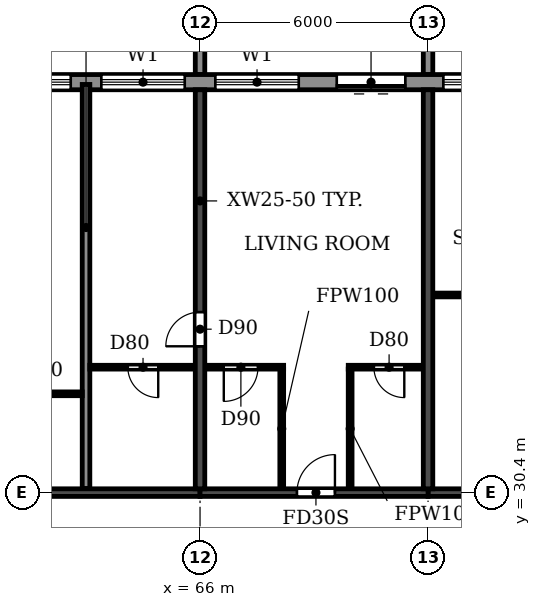
"""IFC4 building model, lengths in metres.
Left out: names, types, materials, properties, quantities, classifications, styles, units other than length and angle.
Written with IfcOpenShell. Run it as: python <this file> out.ifc"""

import sys

from ifc_helpers import new_model, si_unit, direction, frame, frame_2d, origin, place, context, subcontext, project, spatial, polyline, rectangle, outline, extrude, source, transform, mapped, element, fill, save


model = new_model("IFC4")
c1 = context("Model", 3, precision=1e-05, world=origin(), true_north=direction((0.0, 1.0)))
c2 = subcontext(c1, "Body", "Model", "MODEL_VIEW")
j1 = project(units=[si_unit("LENGTHUNIT", "METRE"), si_unit("PLANEANGLEUNIT", "RADIAN")], contexts=[c1])
p1 = place(None, origin())
s1 = spatial("IfcSite", under=j1, at=p1, CompositionType="ELEMENT")
p2 = place(p1, origin())
s2 = spatial("IfcBuilding", under=s1, at=p2, CompositionType="ELEMENT")
p3 = place(p2, frame((0.0, 0.0, 191.7)))
s3 = spatial("IfcBuildingStorey", under=s2, at=p3, CompositionType="ELEMENT", Elevation=191.7)
p4 = place(p3, frame((66.0, 30.5, 0.0), z_axis=(0.0, 0.0, 1.0), x_axis=(0.0, 1.0, 0.0)))
e1 = element("IfcWall", 1, at=p4, inside=s3, PredefinedType="SHEAR", context=c2, shape_type="SweptSolid", body=[
    extrude(rectangle(XDim=10.5, YDim=0.25, at=frame_2d((5.25, 0.0))), origin(), (0.0, 0.0, 1.0), 3.08),
])
p5 = place(p4, frame((3.75, 0.0, 0.0)))
e2 = element("IfcOpeningElement", 2, at=p5, cuts=e1, PredefinedType="OPENING", context=c2, shape_type="SweptSolid", body=[
    extrude(rectangle(XDim=0.9, YDim=2.1, at=frame_2d((0.45, 1.05))), frame((0.0, 0.135, 0.0), z_axis=(0.0, -1.0, 0.0), x_axis=(1.0, 0.0, 0.0)), (0.0, 0.0, 1.0), 0.27),
])
p6 = place(p3, frame((72.0, 30.5, 0.0), z_axis=(0.0, 0.0, 1.0), x_axis=(0.0, 1.0, 0.0)))
e3 = element("IfcWall", 3, at=p6, inside=s3, PredefinedType="SHEAR", context=c2, shape_type="SweptSolid", body=[
    extrude(rectangle(XDim=10.5, YDim=0.25, at=frame_2d((5.25, 0.0))), origin(), (0.0, 0.0, 1.0), 3.08),
])
p7 = place(p3, frame((60.0, 30.4, 0.0), z_axis=(0.0, 0.0, 1.0), x_axis=(1.0, 0.0, 0.0)))
e4 = element("IfcWall", 4, at=p7, inside=s3, PredefinedType="SHEAR", context=c2, shape_type="SweptSolid", body=[
    extrude(rectangle(XDim=6.0, YDim=0.2, at=frame_2d((3.0, 0.0))), origin(), (0.0, 0.0, 1.0), 2.48),
])
p8 = place(p3, frame((66.0, 30.4, 0.0), z_axis=(0.0, 0.0, 1.0), x_axis=(1.0, 0.0, 0.0)))
e5 = element("IfcWall", 5, at=p8, inside=s3, PredefinedType="SHEAR", context=c2, shape_type="SweptSolid", body=[
    extrude(rectangle(XDim=6.0, YDim=0.2, at=frame_2d((3.0, 0.0))), origin(), (0.0, 0.0, 1.0), 2.48),
])
p9 = place(p8, frame((2.55, 0.0, 0.0)))
e6 = element("IfcOpeningElement", 6, at=p9, cuts=e5, PredefinedType="OPENING", context=c2, shape_type="SweptSolid", body=[
    extrude(rectangle(XDim=1.0, YDim=2.1, at=frame_2d((0.5, 1.05))), frame((0.0, 0.11, 0.0), z_axis=(0.0, -1.0, 0.0), x_axis=(1.0, 0.0, 0.0)), (0.0, 0.0, 1.0), 0.22),
])
p10 = place(p3, frame((72.0, 30.4, 0.0), z_axis=(0.0, 0.0, 1.0), x_axis=(1.0, 0.0, 0.0)))
e7 = element("IfcWall", 7, at=p10, inside=s3, PredefinedType="SHEAR", context=c2, shape_type="SweptSolid", body=[
    extrude(rectangle(XDim=6.0, YDim=0.2, at=frame_2d((3.0, 0.0))), origin(), (0.0, 0.0, 1.0), 2.48),
])
p11 = place(p10, frame((2.55, 0.0, 0.0)))
e8 = element("IfcOpeningElement", 8, at=p11, cuts=e7, PredefinedType="OPENING", context=c2, shape_type="SweptSolid", body=[
    extrude(rectangle(XDim=1.0, YDim=2.1, at=frame_2d((0.5, 1.05))), frame((0.0, 0.11, 0.0), z_axis=(0.0, -1.0, 0.0), x_axis=(1.0, 0.0, 0.0)), (0.0, 0.0, 1.0), 0.22),
])
p12 = place(p3, frame((79.317, 41.2, 0.0), z_axis=(0.0, 0.0, 1.0), x_axis=(-1.0, 0.0, 0.0)))
e9 = element("IfcWall", 9, at=p12, inside=s3, PredefinedType="STANDARD", context=c2, shape_type="SweptSolid", body=[
    extrude(rectangle(XDim=56.634, YDim=0.4, at=frame_2d((28.317, 0.0))), origin(), (0.0, 0.0, 1.0), 3.08),
])
p13 = place(p12, frame((52.917, 0.0, 0.0)))
e10 = element("IfcOpeningElement", 10, at=p13, cuts=e9, PredefinedType="OPENING", context=c2, shape_type="SweptSolid", body=[
    extrude(rectangle(XDim=1.8, YDim=2.4, at=frame_2d((0.9, 1.2))), frame((0.0, 0.21, 0.0), z_axis=(0.0, -1.0, 0.0), x_axis=(1.0, 0.0, 0.0)), (0.0, 0.0, 1.0), 0.42),
])
p14 = place(p12, frame((49.717, 0.0, 0.9)))
e11 = element("IfcOpeningElement", 11, at=p14, cuts=e9, PredefinedType="OPENING", context=c2, shape_type="SweptSolid", body=[
    extrude(rectangle(XDim=2.2, YDim=1.5, at=frame_2d((1.1, 0.75))), frame((0.0, 0.21, 0.0), z_axis=(0.0, -1.0, 0.0), x_axis=(1.0, 0.0, 0.0)), (0.0, 0.0, 1.0), 0.42),
])
p15 = place(p12, frame((46.917, 0.0, 0.0)))
e12 = element("IfcOpeningElement", 12, at=p15, cuts=e9, PredefinedType="OPENING", context=c2, shape_type="SweptSolid", body=[
    extrude(rectangle(XDim=1.8, YDim=2.4, at=frame_2d((0.9, 1.2))), frame((0.0, 0.21, 0.0), z_axis=(0.0, -1.0, 0.0), x_axis=(1.0, 0.0, 0.0)), (0.0, 0.0, 1.0), 0.42),
])
p16 = place(p12, frame((43.717, 0.0, 0.9)))
e13 = element("IfcOpeningElement", 13, at=p16, cuts=e9, PredefinedType="OPENING", context=c2, shape_type="SweptSolid", body=[
    extrude(rectangle(XDim=2.2, YDim=1.5, at=frame_2d((1.1, 0.75))), frame((0.0, 0.21, 0.0), z_axis=(0.0, -1.0, 0.0), x_axis=(1.0, 0.0, 0.0)), (0.0, 0.0, 1.0), 0.42),
])
p17 = place(p12, frame((40.717, 0.0, 0.9)))
e14 = element("IfcOpeningElement", 14, at=p17, cuts=e9, PredefinedType="OPENING", context=c2, shape_type="SweptSolid", body=[
    extrude(rectangle(XDim=2.2, YDim=1.5, at=frame_2d((1.1, 0.75))), frame((0.0, 0.21, 0.0), z_axis=(0.0, -1.0, 0.0), x_axis=(1.0, 0.0, 0.0)), (0.0, 0.0, 1.0), 0.42),
])
p18 = place(p12, frame((37.717, 0.0, 0.9)))
e15 = element("IfcOpeningElement", 15, at=p18, cuts=e9, PredefinedType="OPENING", context=c2, shape_type="SweptSolid", body=[
    extrude(rectangle(XDim=2.2, YDim=1.5, at=frame_2d((1.1, 0.75))), frame((0.0, 0.21, 0.0), z_axis=(0.0, -1.0, 0.0), x_axis=(1.0, 0.0, 0.0)), (0.0, 0.0, 1.0), 0.42),
])
p19 = place(p12, frame((34.917, 0.0, 0.0)))
e16 = element("IfcOpeningElement", 16, at=p19, cuts=e9, PredefinedType="OPENING", context=c2, shape_type="SweptSolid", body=[
    extrude(rectangle(XDim=1.8, YDim=2.4, at=frame_2d((0.9, 1.2))), frame((0.0, 0.21, 0.0), z_axis=(0.0, -1.0, 0.0), x_axis=(1.0, 0.0, 0.0)), (0.0, 0.0, 1.0), 0.42),
])
p20 = place(p12, frame((31.717, 0.0, 0.9)))
e17 = element("IfcOpeningElement", 17, at=p20, cuts=e9, PredefinedType="OPENING", context=c2, shape_type="SweptSolid", body=[
    extrude(rectangle(XDim=2.2, YDim=1.5, at=frame_2d((1.1, 0.75))), frame((0.0, 0.21, 0.0), z_axis=(0.0, -1.0, 0.0), x_axis=(1.0, 0.0, 0.0)), (0.0, 0.0, 1.0), 0.42),
])
p21 = place(p12, frame((28.717, 0.0, 0.9)))
e18 = element("IfcOpeningElement", 18, at=p21, cuts=e9, PredefinedType="OPENING", context=c2, shape_type="SweptSolid", body=[
    extrude(rectangle(XDim=2.2, YDim=1.5, at=frame_2d((1.1, 0.75))), frame((0.0, 0.21, 0.0), z_axis=(0.0, -1.0, 0.0), x_axis=(1.0, 0.0, 0.0)), (0.0, 0.0, 1.0), 0.42),
])
p22 = place(p12, frame((25.717, 0.0, 0.9)))
e19 = element("IfcOpeningElement", 19, at=p22, cuts=e9, PredefinedType="OPENING", context=c2, shape_type="SweptSolid", body=[
    extrude(rectangle(XDim=2.2, YDim=1.5, at=frame_2d((1.1, 0.75))), frame((0.0, 0.21, 0.0), z_axis=(0.0, -1.0, 0.0), x_axis=(1.0, 0.0, 0.0)), (0.0, 0.0, 1.0), 0.42),
])
p23 = place(p12, frame((22.917, 0.0, 0.0)))
e20 = element("IfcOpeningElement", 20, at=p23, cuts=e9, PredefinedType="OPENING", context=c2, shape_type="SweptSolid", body=[
    extrude(rectangle(XDim=1.8, YDim=2.4, at=frame_2d((0.9, 1.2))), frame((0.0, 0.21, 0.0), z_axis=(0.0, -1.0, 0.0), x_axis=(1.0, 0.0, 0.0)), (0.0, 0.0, 1.0), 0.42),
])
p24 = place(p12, frame((19.717, 0.0, 0.9)))
e21 = element("IfcOpeningElement", 21, at=p24, cuts=e9, PredefinedType="OPENING", context=c2, shape_type="SweptSolid", body=[
    extrude(rectangle(XDim=2.2, YDim=1.5, at=frame_2d((1.1, 0.75))), frame((0.0, 0.21, 0.0), z_axis=(0.0, -1.0, 0.0), x_axis=(1.0, 0.0, 0.0)), (0.0, 0.0, 1.0), 0.42),
])
p25 = place(p12, frame((16.717, 0.0, 0.9)))
e22 = element("IfcOpeningElement", 22, at=p25, cuts=e9, PredefinedType="OPENING", context=c2, shape_type="SweptSolid", body=[
    extrude(rectangle(XDim=2.2, YDim=1.5, at=frame_2d((1.1, 0.75))), frame((0.0, 0.21, 0.0), z_axis=(0.0, -1.0, 0.0), x_axis=(1.0, 0.0, 0.0)), (0.0, 0.0, 1.0), 0.42),
])
p26 = place(p12, frame((13.717, 0.0, 0.9)))
e23 = element("IfcOpeningElement", 23, at=p26, cuts=e9, PredefinedType="OPENING", context=c2, shape_type="SweptSolid", body=[
    extrude(rectangle(XDim=2.2, YDim=1.5, at=frame_2d((1.1, 0.75))), frame((0.0, 0.21, 0.0), z_axis=(0.0, -1.0, 0.0), x_axis=(1.0, 0.0, 0.0)), (0.0, 0.0, 1.0), 0.42),
])
p27 = place(p12, frame((10.717, 0.0, 0.9)))
e24 = element("IfcOpeningElement", 24, at=p27, cuts=e9, PredefinedType="OPENING", context=c2, shape_type="SweptSolid", body=[
    extrude(rectangle(XDim=2.2, YDim=1.5, at=frame_2d((1.1, 0.75))), frame((0.0, 0.21, 0.0), z_axis=(0.0, -1.0, 0.0), x_axis=(1.0, 0.0, 0.0)), (0.0, 0.0, 1.0), 0.42),
])
p28 = place(p12, frame((7.917, 0.0, 0.0)))
e25 = element("IfcOpeningElement", 25, at=p28, cuts=e9, PredefinedType="OPENING", context=c2, shape_type="SweptSolid", body=[
    extrude(rectangle(XDim=1.8, YDim=2.4, at=frame_2d((0.9, 1.2))), frame((0.0, 0.21, 0.0), z_axis=(0.0, -1.0, 0.0), x_axis=(1.0, 0.0, 0.0)), (0.0, 0.0, 1.0), 0.42),
])
p29 = place(p12, frame((4.717, 0.0, 0.9)))
e26 = element("IfcOpeningElement", 26, at=p29, cuts=e9, PredefinedType="OPENING", context=c2, shape_type="SweptSolid", body=[
    extrude(rectangle(XDim=2.2, YDim=1.5, at=frame_2d((1.1, 0.75))), frame((0.0, 0.21, 0.0), z_axis=(0.0, -1.0, 0.0), x_axis=(1.0, 0.0, 0.0)), (0.0, 0.0, 1.0), 0.42),
])
p30 = place(p12, frame((1.917, 0.0, 0.0)))
e27 = element("IfcOpeningElement", 27, at=p30, cuts=e9, PredefinedType="OPENING", context=c2, shape_type="SweptSolid", body=[
    extrude(rectangle(XDim=1.8, YDim=2.4, at=frame_2d((0.9, 1.2))), frame((0.0, 0.21, 0.0), z_axis=(0.0, -1.0, 0.0), x_axis=(1.0, 0.0, 0.0)), (0.0, 0.0, 1.0), 0.42),
])
m1 = source(origin(), c2, "Body", "SweptSolid", [
    extrude(outline(polyline([(0.0, 0.0), (0.25, 0.0), (0.25, 3.1), (0.0, 3.1), (0.0, 0.0)])), origin(), (0.0, 0.0, 1.0), 3.1),
])
for number, where in (
    (28, (65.875, 41.4, 0.0)),
    (29, (71.875, 41.4, 0.0)),
):
    element("IfcWall", number, at=place(p3, frame(where)), inside=s3, PredefinedType="STANDARD", context=c2, shape_type="MappedRepresentation", body=[
        mapped(m1, transform((0.0, 0.0, 0.0))),
    ])
p31 = place(p3, frame((63.0, 30.51, 0.0), z_axis=(0.0, 0.0, 1.0), x_axis=(0.0, 1.0, 0.0)))
e30 = element("IfcWall", 30, at=p31, inside=s3, PredefinedType="PARTITIONING", context=c2, shape_type="SweptSolid", body=[
    extrude(rectangle(XDim=10.63, YDim=0.2, at=frame_2d((5.315, 0.0))), origin(), (0.0, 0.0, 1.0), 3.08),
])
p32 = place(p3, frame((60.135, 33.0, 0.0), z_axis=(0.0, 0.0, 1.0), x_axis=(1.0, 0.0, 0.0)))
e31 = element("IfcWall", 31, at=p32, inside=s3, PredefinedType="PARTITIONING", context=c2, shape_type="SweptSolid", body=[
    extrude(rectangle(XDim=2.765, YDim=0.1, at=frame_2d((1.382, 0.0))), origin(), (0.0, 0.0, 1.0), 3.08),
])
p33 = place(p32, frame((0.965, 0.0, 0.0)))
e32 = element("IfcOpeningElement", 32, at=p33, cuts=e31, PredefinedType="OPENING", context=c2, shape_type="SweptSolid", body=[
    extrude(rectangle(XDim=0.8, YDim=2.1, at=frame_2d((0.4, 1.05))), frame((0.0, 0.06, 0.0), z_axis=(0.0, -1.0, 0.0), x_axis=(1.0, 0.0, 0.0)), (0.0, 0.0, 1.0), 0.12),
])
p34 = place(p3, frame((63.1, 33.7, 0.0), z_axis=(0.0, 0.0, 1.0), x_axis=(1.0, 0.0, 0.0)))
e33 = element("IfcWall", 33, at=p34, inside=s3, PredefinedType="PARTITIONING", context=c2, shape_type="SweptSolid", body=[
    extrude(rectangle(XDim=2.765, YDim=0.1, at=frame_2d((1.382, 0.0))), origin(), (0.0, 0.0, 1.0), 3.08),
])
p35 = place(p34, frame((1.0, 0.0, 0.0)))
e34 = element("IfcOpeningElement", 34, at=p35, cuts=e33, PredefinedType="OPENING", context=c2, shape_type="SweptSolid", body=[
    extrude(rectangle(XDim=0.8, YDim=2.1, at=frame_2d((0.4, 1.05))), frame((0.0, 0.06, 0.0), z_axis=(0.0, -1.0, 0.0), x_axis=(1.0, 0.0, 0.0)), (0.0, 0.0, 1.0), 0.12),
])
p36 = place(p3, frame((66.135, 33.7, 0.0), z_axis=(0.0, 0.0, 1.0), x_axis=(1.0, 0.0, 0.0)))
e35 = element("IfcWall", 35, at=p36, inside=s3, PredefinedType="PARTITIONING", context=c2, shape_type="SweptSolid", body=[
    extrude(rectangle(XDim=2.065, YDim=0.1, at=frame_2d((1.032, 0.0))), origin(), (0.0, 0.0, 1.0), 3.08),
])
p37 = place(p36, frame((0.49, 0.0, 0.0)))
e36 = element("IfcOpeningElement", 36, at=p37, cuts=e35, PredefinedType="OPENING", context=c2, shape_type="SweptSolid", body=[
    extrude(rectangle(XDim=0.9, YDim=2.1, at=frame_2d((0.45, 1.05))), frame((0.0, 0.06, 0.0), z_axis=(0.0, -1.0, 0.0), x_axis=(1.0, 0.0, 0.0)), (0.0, 0.0, 1.0), 0.12),
])
p38 = place(p3, frame((69.9, 33.7, 0.0), z_axis=(0.0, 0.0, 1.0), x_axis=(1.0, 0.0, 0.0)))
e37 = element("IfcWall", 37, at=p38, inside=s3, PredefinedType="PARTITIONING", context=c2, shape_type="SweptSolid", body=[
    extrude(rectangle(XDim=1.965, YDim=0.1, at=frame_2d((0.982, 0.0))), origin(), (0.0, 0.0, 1.0), 3.08),
])
p39 = place(p38, frame((0.675, 0.0, 0.0)))
e38 = element("IfcOpeningElement", 38, at=p39, cuts=e37, PredefinedType="OPENING", context=c2, shape_type="SweptSolid", body=[
    extrude(rectangle(XDim=0.8, YDim=2.1, at=frame_2d((0.4, 1.05))), frame((0.0, 0.06, 0.0), z_axis=(0.0, -1.0, 0.0), x_axis=(1.0, 0.0, 0.0)), (0.0, 0.0, 1.0), 0.12),
])
p40 = place(p3, frame((72.135, 35.6, 0.0), z_axis=(0.0, 0.0, 1.0), x_axis=(1.0, 0.0, 0.0)))
e39 = element("IfcWall", 39, at=p40, inside=s3, PredefinedType="PARTITIONING", context=c2, shape_type="SweptSolid", body=[
    extrude(rectangle(XDim=2.065, YDim=0.1, at=frame_2d((1.032, 0.0))), origin(), (0.0, 0.0, 1.0), 3.08),
])
for number, where, z_axis, x_axis in (
    (40, (68.15, 30.51, 0.0), (0.0, 0.0, 1.0), (0.0, 1.0, 0.0)),
    (41, (69.95, 30.51, 0.0), (0.0, 0.0, 1.0), (0.0, 1.0, 0.0)),
):
    element("IfcWall", number, at=place(p3, frame(where, z_axis=z_axis, x_axis=x_axis)), inside=s3, PredefinedType="PARTITIONING", context=c2, shape_type="SweptSolid", body=[
        extrude(rectangle(XDim=3.14, YDim=0.1, at=frame_2d((1.57, 0.0))), origin(), (0.0, 0.0, 1.0), 3.08),
    ])
p41 = place(p25, origin())
e42 = element("IfcWindow", 42, at=p41, inside=s3, PartitioningType="DOUBLE_PANEL_HORIZONTAL", PredefinedType="WINDOW", context=c2, shape_type="SweptSolid", body=[
    extrude(rectangle(XDim=2.2, YDim=1.5, at=frame_2d((1.1, 0.75))), frame((0.0, 0.03, 0.0), z_axis=(0.0, -1.0, 0.0), x_axis=(1.0, 0.0, 0.0)), (0.0, 0.0, 1.0), 0.06),
])
fill(e22, e42)
p42 = place(p26, origin())
e43 = element("IfcWindow", 43, at=p42, inside=s3, PartitioningType="DOUBLE_PANEL_HORIZONTAL", PredefinedType="WINDOW", context=c2, shape_type="SweptSolid", body=[
    extrude(rectangle(XDim=2.2, YDim=1.5, at=frame_2d((1.1, 0.75))), frame((0.0, 0.03, 0.0), z_axis=(0.0, -1.0, 0.0), x_axis=(1.0, 0.0, 0.0)), (0.0, 0.0, 1.0), 0.06),
])
fill(e23, e43)
p43 = place(p27, origin())
e44 = element("IfcWindow", 44, at=p43, inside=s3, PartitioningType="DOUBLE_PANEL_HORIZONTAL", PredefinedType="WINDOW", context=c2, shape_type="SweptSolid", body=[
    extrude(rectangle(XDim=2.2, YDim=1.5, at=frame_2d((1.1, 0.75))), frame((0.0, 0.03, 0.0), z_axis=(0.0, -1.0, 0.0), x_axis=(1.0, 0.0, 0.0)), (0.0, 0.0, 1.0), 0.06),
])
fill(e24, e44)
p44 = place(p28, origin())
e45 = element("IfcDoor", 45, at=p44, inside=s3, OperationType="DOUBLE_DOOR_SLIDING", PredefinedType="DOOR", context=c2, shape_type="SweptSolid", body=[
    extrude(rectangle(XDim=1.8, YDim=2.4, at=frame_2d((0.9, 1.2))), frame((0.0, 0.025, 0.0), z_axis=(0.0, -1.0, 0.0), x_axis=(1.0, 0.0, 0.0)), (0.0, 0.0, 1.0), 0.05),
])
fill(e25, e45)
p45 = place(p29, origin())
e46 = element("IfcWindow", 46, at=p45, inside=s3, PartitioningType="DOUBLE_PANEL_HORIZONTAL", PredefinedType="WINDOW", context=c2, shape_type="SweptSolid", body=[
    extrude(rectangle(XDim=2.2, YDim=1.5, at=frame_2d((1.1, 0.75))), frame((0.0, 0.03, 0.0), z_axis=(0.0, -1.0, 0.0), x_axis=(1.0, 0.0, 0.0)), (0.0, 0.0, 1.0), 0.06),
])
fill(e26, e46)
p46 = place(p35, frame((0.8, 0.0, 0.0), z_axis=(0.0, 0.0, 1.0), x_axis=(-1.0, 0.0, 0.0)))
e47 = element("IfcDoor", 47, at=p46, inside=s3, OperationType="SINGLE_SWING_LEFT", PredefinedType="DOOR", context=c2, shape_type="SweptSolid", body=[
    extrude(rectangle(XDim=0.8, YDim=2.1, at=frame_2d((0.4, 1.05))), frame((0.0, 0.025, 0.0), z_axis=(0.0, -1.0, 0.0), x_axis=(1.0, 0.0, 0.0)), (0.0, 0.0, 1.0), 0.05),
])
fill(e34, e47)
p47 = place(p5, origin())
e48 = element("IfcDoor", 48, at=p47, inside=s3, OperationType="SINGLE_SWING_LEFT", PredefinedType="DOOR", context=c2, shape_type="SweptSolid", body=[
    extrude(rectangle(XDim=0.9, YDim=2.1, at=frame_2d((0.45, 1.05))), frame((0.0, 0.025, 0.0), z_axis=(0.0, -1.0, 0.0), x_axis=(1.0, 0.0, 0.0)), (0.0, 0.0, 1.0), 0.05),
])
fill(e2, e48)
p48 = place(p37, frame((0.9, 0.0, 0.0), z_axis=(0.0, 0.0, 1.0), x_axis=(-1.0, 0.0, 0.0)))
e49 = element("IfcDoor", 49, at=p48, inside=s3, OperationType="SINGLE_SWING_RIGHT", PredefinedType="DOOR", context=c2, shape_type="SweptSolid", body=[
    extrude(rectangle(XDim=0.9, YDim=2.1, at=frame_2d((0.45, 1.05))), frame((0.0, 0.025, 0.0), z_axis=(0.0, -1.0, 0.0), x_axis=(1.0, 0.0, 0.0)), (0.0, 0.0, 1.0), 0.05),
])
fill(e36, e49)
p49 = place(p9, origin())
e50 = element("IfcDoor", 50, at=p49, inside=s3, OperationType="SINGLE_SWING_RIGHT", PredefinedType="DOOR", context=c2, shape_type="SweptSolid", body=[
    extrude(rectangle(XDim=1.0, YDim=2.1, at=frame_2d((0.5, 1.05))), frame((0.0, 0.025, 0.0), z_axis=(0.0, -1.0, 0.0), x_axis=(1.0, 0.0, 0.0)), (0.0, 0.0, 1.0), 0.05),
])
fill(e6, e50)
p50 = place(p39, frame((0.8, 0.0, 0.0), z_axis=(0.0, 0.0, 1.0), x_axis=(-1.0, 0.0, 0.0)))
e51 = element("IfcDoor", 51, at=p50, inside=s3, OperationType="SINGLE_SWING_LEFT", PredefinedType="DOOR", context=c2, shape_type="SweptSolid", body=[
    extrude(rectangle(XDim=0.8, YDim=2.1, at=frame_2d((0.4, 1.05))), frame((0.0, 0.025, 0.0), z_axis=(0.0, -1.0, 0.0), x_axis=(1.0, 0.0, 0.0)), (0.0, 0.0, 1.0), 0.05),
])
fill(e38, e51)
save(model, sys.argv[1])
